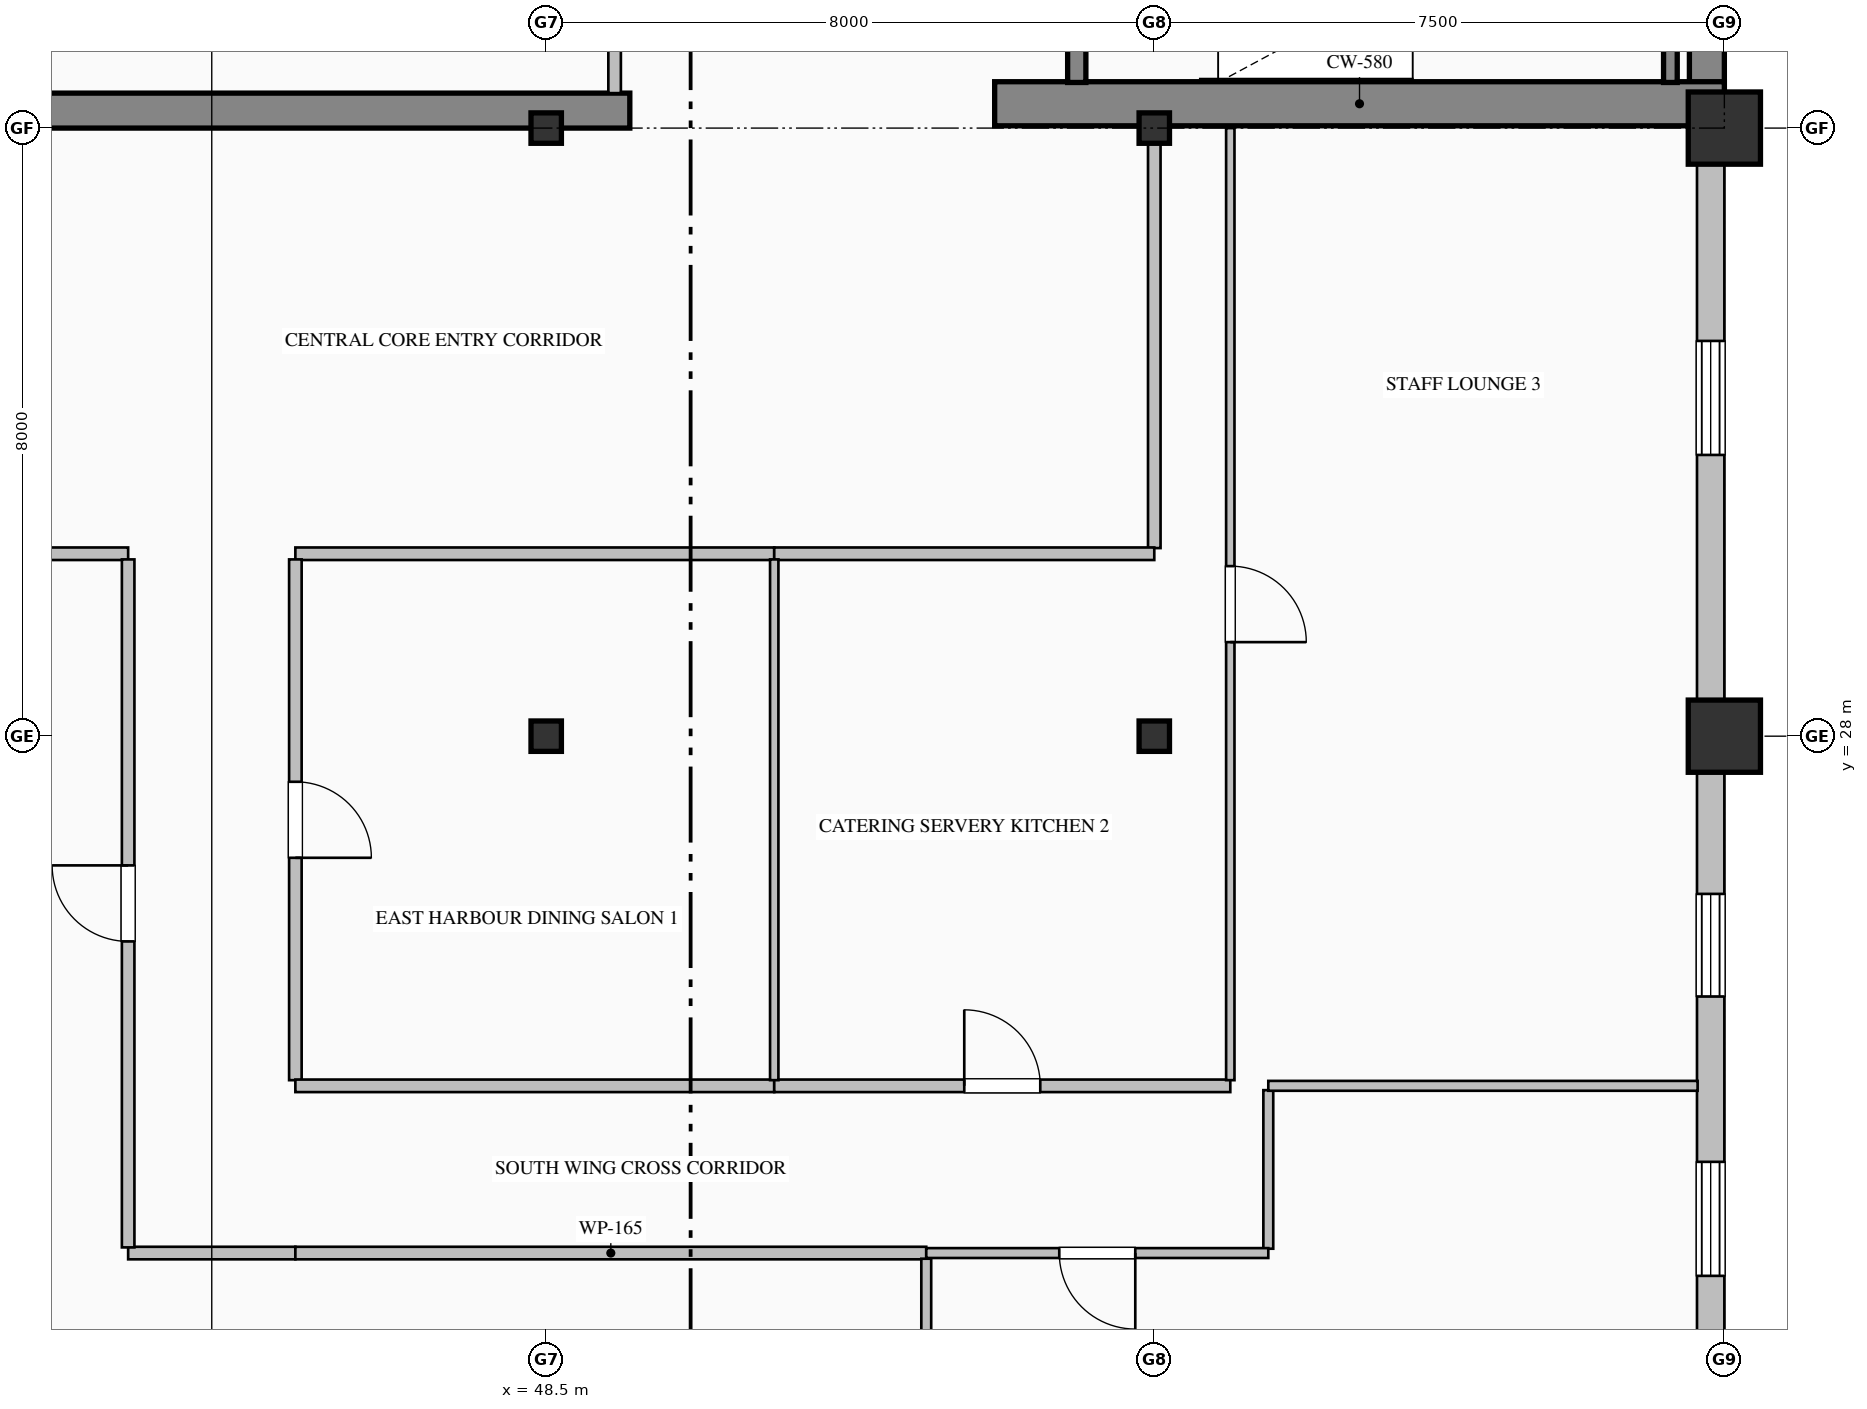
"""IFC4 building model, lengths in metres.
Left out: names, types, materials, properties, quantities, classifications, styles, units other than length and angle.
Written with IfcOpenShell. Run it as: python <this file> out.ifc"""

import sys

from ifc_helpers import new_model, si_unit, direction, frame, frame_2d, origin, origin_2d, place, context, subcontext, project, spatial, rectangle, hollow_rectangle, i_section, extrude, element, fill, save


model = new_model("IFC4")
c1 = context("Model", 3, precision=1e-05, world=origin(), true_north=direction((0.0, 1.0)))
c2 = subcontext(c1, "Body", "Model", "MODEL_VIEW")
j1 = project(units=[si_unit("LENGTHUNIT", "METRE"), si_unit("PLANEANGLEUNIT", "RADIAN")], contexts=[c1])
p1 = place(None, origin())
s1 = spatial("IfcSite", under=j1, at=p1, CompositionType="ELEMENT")
p2 = place(p1, origin())
s2 = spatial("IfcBuilding", under=s1, at=p2, CompositionType="ELEMENT")
p3 = place(p2, frame((0.0, 0.0, 245.8)))
s3 = spatial("IfcBuildingStorey", under=s2, at=p3, CompositionType="ELEMENT", Elevation=245.8)
p4 = place(p3, frame((63.77, 36.32, 0.0), z_axis=(0.0, 0.0, 1.0), x_axis=(0.0, 1.0, 0.0)))
e1 = element("IfcWall", 1, at=p4, inside=s3, PredefinedType="SHEAR", context=c2, shape_type="SweptSolid", body=[
    extrude(rectangle(XDim=15.22, YDim=0.46, at=frame_2d((7.61, 0.0))), origin(), (0.0, 0.0, 1.0), 3.775),
])
p5 = place(p3, frame((40.5, 36.23, 0.0), z_axis=(0.0, 0.0, 1.0), x_axis=(1.0, 0.0, 0.0)))
e2 = element("IfcWall", 2, at=p5, inside=s3, PredefinedType="SHEAR", context=c2, shape_type="SweptSolid", body=[
    extrude(rectangle(XDim=9.1, YDim=0.46, at=frame_2d((4.55, 0.0))), origin(), (0.0, 0.0, 1.0), 3.775),
])
p6 = place(p3, frame((54.4, 36.32, 0.0), z_axis=(0.0, 0.0, 1.0), x_axis=(1.0, 0.0, 0.0)))
e3 = element("IfcWall", 3, at=p6, inside=s3, PredefinedType="SHEAR", context=c2, shape_type="SweptSolid", body=[
    extrude(rectangle(XDim=9.6, YDim=0.58, at=frame_2d((4.8, 0.0))), origin(), (0.0, 0.0, 1.0), 4.0),
])
for number, where, z_axis, x_axis in (
    (4, (48.5, 28.0, 0.0), (0.0, 0.0, 1.0), (1.0, 0.0, 0.0)),
    (5, (48.5, 36.0, 0.0), (0.0, 0.0, 1.0), (1.0, 0.0, 0.0)),
    (6, (56.5, 28.0, 0.0), (0.0, 0.0, 1.0), (1.0, 0.0, 0.0)),
    (7, (56.5, 36.0, 0.0), (0.0, 0.0, 1.0), (1.0, 0.0, 0.0)),
):
    element("IfcColumn", number, at=place(p3, frame(where, z_axis=z_axis, x_axis=x_axis)), inside=s3, PredefinedType="COLUMN", context=c2, shape_type="SweptSolid", body=[
        extrude(i_section(OverallWidth=0.4, OverallDepth=0.4, WebThickness=0.013, FlangeThickness=0.021, FilletRadius=0.022, at=origin_2d()), origin(), (0.0, 0.0, 1.0), 4.0),
    ])
for number, where, z_axis, x_axis in (
    (8, (64.0, 28.0, 0.0), (0.0, 0.0, 1.0), (1.0, 0.0, 0.0)),
    (9, (64.0, 36.0, 0.0), (0.0, 0.0, 1.0), (1.0, 0.0, 0.0)),
):
    element("IfcColumn", number, at=place(p3, frame(where, z_axis=z_axis, x_axis=x_axis)), inside=s3, PredefinedType="COLUMN", context=c2, shape_type="SweptSolid", body=[
        extrude(hollow_rectangle(XDim=0.95, YDim=0.95, WallThickness=0.036, at=origin_2d()), origin(), (0.0, 0.0, 1.0), 4.0),
    ])
p7 = place(p3, frame((63.82, 36.05, 0.0), z_axis=(0.0, 0.0, 1.0), x_axis=(0.0, -1.0, 0.0)))
e10 = element("IfcWall", 10, at=p7, inside=s3, PredefinedType="SOLIDWALL", context=c2, shape_type="SweptSolid", body=[
    extrude(rectangle(XDim=19.55, YDim=0.36, at=frame_2d((9.775, 0.0))), origin(), (0.0, 0.0, 1.0), 3.325),
])
p8 = place(p7, frame((2.85, 0.0, 0.7)))
e11 = element("IfcOpeningElement", 11, at=p8, cuts=e10, PredefinedType="OPENING", context=c2, shape_type="SweptSolid", body=[
    extrude(rectangle(XDim=1.5, YDim=2.4, at=frame_2d((0.75, 1.2))), frame((0.0, 0.19, 0.0), z_axis=(0.0, -1.0, 0.0), x_axis=(1.0, 0.0, 0.0)), (0.0, 0.0, 1.0), 0.38),
])
p9 = place(p7, frame((10.125, 0.0, 0.9)))
e12 = element("IfcOpeningElement", 12, at=p9, cuts=e10, PredefinedType="OPENING", context=c2, shape_type="SweptSolid", body=[
    extrude(rectangle(XDim=1.35, YDim=1.85, at=frame_2d((0.675, 0.925))), frame((0.0, 0.19, 0.0), z_axis=(0.0, -1.0, 0.0), x_axis=(1.0, 0.0, 0.0)), (0.0, 0.0, 1.0), 0.38),
])
p10 = place(p7, frame((13.65, 0.0, 0.7)))
e13 = element("IfcOpeningElement", 13, at=p10, cuts=e10, PredefinedType="OPENING", context=c2, shape_type="SweptSolid", body=[
    extrude(rectangle(XDim=1.5, YDim=2.4, at=frame_2d((0.75, 1.2))), frame((0.0, 0.19, 0.0), z_axis=(0.0, -1.0, 0.0), x_axis=(1.0, 0.0, 0.0)), (0.0, 0.0, 1.0), 0.38),
])
p11 = place(p3, frame((55.48, 39.75, 0.0), z_axis=(0.0, 0.0, 1.0), x_axis=(0.0, -1.0, 0.0)))
e14 = element("IfcWall", 14, at=p11, inside=s3, PredefinedType="SOLIDWALL", context=c2, shape_type="SweptSolid", body=[
    extrude(rectangle(XDim=3.15, YDim=0.24, at=frame_2d((1.575, 0.0))), origin(), (0.0, 0.0, 1.0), 4.0),
])
p12 = place(p11, frame((1.0, 0.0, 0.0)))
e15 = element("IfcOpeningElement", 15, at=p12, cuts=e14, PredefinedType="OPENING", context=c2, shape_type="SweptSolid", body=[
    extrude(rectangle(XDim=1.15, YDim=2.2, at=frame_2d((0.575, 1.1))), frame((0.0, 0.13, 0.0), z_axis=(0.0, -1.0, 0.0), x_axis=(1.0, 0.0, 0.0)), (0.0, 0.0, 1.0), 0.26),
])
p13 = place(p3, frame((63.29, 36.6, 0.0), z_axis=(0.0, 0.0, 1.0), x_axis=(0.0, 1.0, 0.0)))
e16 = element("IfcWall", 16, at=p13, inside=s3, PredefinedType="SOLIDWALL", context=c2, shape_type="SweptSolid", body=[
    extrude(rectangle(XDim=3.15, YDim=0.18, at=frame_2d((1.575, 0.0))), origin(), (0.0, 0.0, 1.0), 4.0),
])
p14 = place(p3, frame((49.4, 36.46, 0.0), z_axis=(0.0, 0.0, 1.0), x_axis=(0.0, 1.0, 0.0)))
e17 = element("IfcWall", 17, at=p14, inside=s3, PredefinedType="PARTITIONING", context=c2, shape_type="SweptSolid", body=[
    extrude(rectangle(XDim=3.093, YDim=0.165, at=frame_2d((1.546, 0.0))), origin(), (0.0, 0.0, 1.0), 3.017),
])
p15 = place(p14, frame((1.046, 0.0, 0.0)))
e18 = element("IfcOpeningElement", 18, at=p15, cuts=e17, PredefinedType="OPENING", context=c2, shape_type="SweptSolid", body=[
    extrude(rectangle(XDim=1.0, YDim=2.15, at=frame_2d((0.5, 1.075))), frame((0.0, 0.093, 0.0), z_axis=(0.0, -1.0, 0.0), x_axis=(1.0, 0.0, 0.0)), (0.0, 0.0, 1.0), 0.185),
])
p16 = place(p3, frame((51.5, 30.4, 0.0), z_axis=(0.0, 0.0, 1.0), x_axis=(-1.0, 0.0, 0.0)))
e19 = element("IfcWall", 19, at=p16, inside=s3, PredefinedType="PARTITIONING", context=c2, shape_type="SweptSolid", body=[
    extrude(rectangle(XDim=6.3, YDim=0.165, at=frame_2d((3.15, 0.0))), origin(), (0.0, 0.0, 1.0), 3.775),
])
p17 = place(p3, frame((56.5, 36.0, 0.0), z_axis=(0.0, 0.0, 1.0), x_axis=(0.0, -1.0, 0.0)))
e20 = element("IfcWall", 20, at=p17, inside=s3, PredefinedType="PARTITIONING", context=c2, shape_type="SweptSolid", body=[
    extrude(rectangle(XDim=5.525, YDim=0.165, at=frame_2d((2.763, 0.0))), origin(), (0.0, 0.0, 1.0), 3.179),
])
p18 = place(p3, frame((56.5, 30.4, 0.0), z_axis=(0.0, 0.0, 1.0), x_axis=(-1.0, 0.0, 0.0)))
e21 = element("IfcWall", 21, at=p18, inside=s3, PredefinedType="PARTITIONING", context=c2, shape_type="SweptSolid", body=[
    extrude(rectangle(XDim=5.0, YDim=0.165, at=frame_2d((2.5, 0.0))), origin(), (0.0, 0.0, 1.0), 3.775),
])
p19 = place(p3, frame((43.0, 30.4, 0.0), z_axis=(0.0, 0.0, 1.0), x_axis=(-1.0, 0.0, 0.0)))
e22 = element("IfcWall", 22, at=p19, inside=s3, PredefinedType="PARTITIONING", context=c2, shape_type="SweptSolid", body=[
    extrude(rectangle(XDim=2.5, YDim=0.165, at=frame_2d((1.25, 0.0))), origin(), (0.0, 0.0, 1.0), 3.775),
])
p20 = place(p3, frame((45.2, 30.325, 0.0), z_axis=(0.0, 0.0, 1.0), x_axis=(0.0, -1.0, 0.0)))
e23 = element("IfcWall", 23, at=p20, inside=s3, PredefinedType="PARTITIONING", context=c2, shape_type="SweptSolid", body=[
    extrude(rectangle(XDim=6.851, YDim=0.165, at=frame_2d((3.425, 0.0))), origin(), (0.0, 0.0, 1.0), 3.775),
])
p21 = place(p20, frame((2.926, 0.0, 0.0)))
e24 = element("IfcOpeningElement", 24, at=p21, cuts=e23, PredefinedType="OPENING", context=c2, shape_type="SweptSolid", body=[
    extrude(rectangle(XDim=1.0, YDim=2.15, at=frame_2d((0.5, 1.075))), frame((0.0, 0.093, 0.0), z_axis=(0.0, -1.0, 0.0), x_axis=(1.0, 0.0, 0.0)), (0.0, 0.0, 1.0), 0.185),
])
p22 = place(p3, frame((45.2, 21.2, 0.0), z_axis=(0.0, 0.0, 1.0), x_axis=(-1.0, 0.0, 0.0)))
e25 = element("IfcWall", 25, at=p22, inside=s3, PredefinedType="PARTITIONING", context=c2, shape_type="SweptSolid", body=[
    extrude(rectangle(XDim=2.2, YDim=0.165, at=frame_2d((1.1, 0.0))), origin(), (0.0, 0.0, 1.0), 3.775),
])
p23 = place(p3, frame((43.0, 21.274, 0.0), z_axis=(0.0, 0.0, 1.0), x_axis=(0.0, 1.0, 0.0)))
e26 = element("IfcWall", 26, at=p23, inside=s3, PredefinedType="PARTITIONING", context=c2, shape_type="SweptSolid", body=[
    extrude(rectangle(XDim=9.051, YDim=0.165, at=frame_2d((4.525, 0.0))), origin(), (0.0, 0.0, 1.0), 3.775),
])
p24 = place(p23, frame((4.025, 0.0, 0.0)))
e27 = element("IfcOpeningElement", 27, at=p24, cuts=e26, PredefinedType="OPENING", context=c2, shape_type="SweptSolid", body=[
    extrude(rectangle(XDim=1.0, YDim=2.15, at=frame_2d((0.5, 1.075))), frame((0.0, 0.093, 0.0), z_axis=(0.0, -1.0, 0.0), x_axis=(1.0, 0.0, 0.0)), (0.0, 0.0, 1.0), 0.185),
])
p25 = place(p3, frame((45.2, 23.4, 0.0), z_axis=(0.0, 0.0, 1.0), x_axis=(1.0, 0.0, 0.0)))
e28 = element("IfcWall", 28, at=p25, inside=s3, PredefinedType="PARTITIONING", context=c2, shape_type="SweptSolid", body=[
    extrude(rectangle(XDim=6.3, YDim=0.165, at=frame_2d((3.15, 0.0))), origin(), (0.0, 0.0, 1.0), 3.467),
])
p26 = place(p3, frame((51.5, 23.4, 0.0), z_axis=(0.0, 0.0, 1.0), x_axis=(1.0, 0.0, 0.0)))
e29 = element("IfcWall", 29, at=p26, inside=s3, PredefinedType="PARTITIONING", context=c2, shape_type="SweptSolid", body=[
    extrude(rectangle(XDim=6.0, YDim=0.165, at=frame_2d((3.0, 0.0))), origin(), (0.0, 0.0, 1.0), 3.467),
])
p27 = place(p26, frame((2.5, 0.0, 0.0)))
e30 = element("IfcOpeningElement", 30, at=p27, cuts=e29, PredefinedType="OPENING", context=c2, shape_type="SweptSolid", body=[
    extrude(rectangle(XDim=1.0, YDim=2.15, at=frame_2d((0.5, 1.075))), frame((0.0, 0.093, 0.0), z_axis=(0.0, -1.0, 0.0), x_axis=(1.0, 0.0, 0.0)), (0.0, 0.0, 1.0), 0.185),
])
p28 = place(p3, frame((53.5, 21.2, 0.0), z_axis=(0.0, 0.0, 1.0), x_axis=(-1.0, 0.0, 0.0)))
e31 = element("IfcWall", 31, at=p28, inside=s3, PredefinedType="PARTITIONING", context=c2, shape_type="SweptSolid", body=[
    extrude(rectangle(XDim=8.3, YDim=0.165, at=frame_2d((4.15, 0.0))), origin(), (0.0, 0.0, 1.0), 3.775),
])
p29 = place(p3, frame((58.0, 23.343, 0.0), z_axis=(0.0, 0.0, 1.0), x_axis=(0.0, -1.0, 0.0)))
e32 = element("IfcWall", 32, at=p29, inside=s3, PredefinedType="PARTITIONING", context=c2, shape_type="SweptSolid", body=[
    extrude(rectangle(XDim=2.086, YDim=0.13, at=frame_2d((1.043, 0.0))), origin(), (0.0, 0.0, 1.0), 3.775),
])
p30 = place(p3, frame((58.0, 21.2, 0.0), z_axis=(0.0, 0.0, 1.0), x_axis=(-1.0, 0.0, 0.0)))
e33 = element("IfcWall", 33, at=p30, inside=s3, PredefinedType="PARTITIONING", context=c2, shape_type="SweptSolid", body=[
    extrude(rectangle(XDim=4.5, YDim=0.13, at=frame_2d((2.25, 0.0))), origin(), (0.0, 0.0, 1.0), 3.775),
])
p31 = place(p30, frame((1.75, 0.0, 0.0)))
e34 = element("IfcOpeningElement", 34, at=p31, cuts=e33, PredefinedType="OPENING", context=c2, shape_type="SweptSolid", body=[
    extrude(rectangle(XDim=1.0, YDim=2.15, at=frame_2d((0.5, 1.075))), frame((0.0, 0.075, 0.0), z_axis=(0.0, -1.0, 0.0), x_axis=(1.0, 0.0, 0.0)), (0.0, 0.0, 1.0), 0.15),
])
p32 = place(p3, frame((51.5, 30.325, 0.0), z_axis=(0.0, 0.0, 1.0), x_axis=(0.0, -1.0, 0.0)))
e35 = element("IfcWall", 35, at=p32, inside=s3, PredefinedType="MOVABLE", context=c2, shape_type="SweptSolid", body=[
    extrude(rectangle(XDim=6.851, YDim=0.11, at=frame_2d((3.425, 0.0))), origin(), (0.0, 0.0, 1.0), 3.775),
])
p33 = place(p3, frame((57.5, 36.0, 0.0), z_axis=(0.0, 0.0, 1.0), x_axis=(0.0, -1.0, 0.0)))
e36 = element("IfcWall", 36, at=p33, inside=s3, PredefinedType="MOVABLE", context=c2, shape_type="SweptSolid", body=[
    extrude(rectangle(XDim=12.525, YDim=0.11, at=frame_2d((6.263, 0.0))), origin(), (0.0, 0.0, 1.0), 3.775),
])
p34 = place(p33, frame((5.763, 0.0, 0.0)))
e37 = element("IfcOpeningElement", 37, at=p34, cuts=e36, PredefinedType="OPENING", context=c2, shape_type="SweptSolid", body=[
    extrude(rectangle(XDim=1.0, YDim=2.15, at=frame_2d((0.5, 1.075))), frame((0.0, 0.065, 0.0), z_axis=(0.0, -1.0, 0.0), x_axis=(1.0, 0.0, 0.0)), (0.0, 0.0, 1.0), 0.13),
])
p35 = place(p3, frame((63.648, 23.4, 0.0), z_axis=(0.0, 0.0, 1.0), x_axis=(-1.0, 0.0, 0.0)))
e38 = element("IfcWall", 38, at=p35, inside=s3, PredefinedType="PARTITIONING", context=c2, shape_type="SweptSolid", body=[
    extrude(rectangle(XDim=5.648, YDim=0.13, at=frame_2d((2.824, 0.0))), origin(), (0.0, 0.0, 1.0), 3.775),
])
p36 = place(p3, frame((53.5, 21.125, 0.0), z_axis=(0.0, 0.0, 1.0), x_axis=(0.0, -1.0, 0.0)))
e39 = element("IfcWall", 39, at=p36, inside=s3, PredefinedType="PARTITIONING", context=c2, shape_type="SweptSolid", body=[
    extrude(rectangle(XDim=8.273, YDim=0.13, at=frame_2d((4.137, 0.0))), origin(), (0.0, 0.0, 1.0), 3.775),
])
p37 = place(p8, origin())
e40 = element("IfcWindow", 40, at=p37, inside=s3, PartitioningType="DOUBLE_PANEL_HORIZONTAL", PredefinedType="WINDOW", context=c2, shape_type="SweptSolid", body=[
    extrude(rectangle(XDim=1.5, YDim=2.4, at=frame_2d((0.75, 1.2))), frame((0.0, 0.15, 0.0), z_axis=(0.0, -1.0, 0.0), x_axis=(1.0, 0.0, 0.0)), (0.0, 0.0, 1.0), 0.06),
])
fill(e11, e40)
p38 = place(p9, origin())
e41 = element("IfcWindow", 41, at=p38, inside=s3, PartitioningType="DOUBLE_PANEL_VERTICAL", PredefinedType="WINDOW", context=c2, shape_type="SweptSolid", body=[
    extrude(rectangle(XDim=1.35, YDim=1.85, at=frame_2d((0.675, 0.925))), frame((0.0, 0.15, 0.0), z_axis=(0.0, -1.0, 0.0), x_axis=(1.0, 0.0, 0.0)), (0.0, 0.0, 1.0), 0.06),
])
fill(e12, e41)
p39 = place(p10, origin())
e42 = element("IfcWindow", 42, at=p39, inside=s3, PartitioningType="DOUBLE_PANEL_HORIZONTAL", PredefinedType="WINDOW", context=c2, shape_type="SweptSolid", body=[
    extrude(rectangle(XDim=1.5, YDim=2.4, at=frame_2d((0.75, 1.2))), frame((0.0, 0.15, 0.0), z_axis=(0.0, -1.0, 0.0), x_axis=(1.0, 0.0, 0.0)), (0.0, 0.0, 1.0), 0.06),
])
fill(e13, e42)
p40 = place(p21, origin())
e43 = element("IfcDoor", 43, at=p40, inside=s3, OperationType="SINGLE_SWING_RIGHT", PredefinedType="DOOR", context=c2, shape_type="SweptSolid", body=[
    extrude(rectangle(XDim=1.0, YDim=2.15, at=frame_2d((0.5, 1.075))), frame((0.0, 0.025, 0.0), z_axis=(0.0, -1.0, 0.0), x_axis=(1.0, 0.0, 0.0)), (0.0, 0.0, 1.0), 0.05),
])
fill(e24, e43)
p41 = place(p27, origin())
e44 = element("IfcDoor", 44, at=p41, inside=s3, OperationType="SINGLE_SWING_LEFT", PredefinedType="DOOR", context=c2, shape_type="SweptSolid", body=[
    extrude(rectangle(XDim=1.0, YDim=2.15, at=frame_2d((0.5, 1.075))), frame((0.0, 0.025, 0.0), z_axis=(0.0, -1.0, 0.0), x_axis=(1.0, 0.0, 0.0)), (0.0, 0.0, 1.0), 0.05),
])
fill(e30, e44)
p42 = place(p34, origin())
e45 = element("IfcDoor", 45, at=p42, inside=s3, OperationType="SINGLE_SWING_RIGHT", PredefinedType="DOOR", context=c2, shape_type="SweptSolid", body=[
    extrude(rectangle(XDim=1.0, YDim=2.15, at=frame_2d((0.5, 1.075))), frame((0.0, 0.025, 0.0), z_axis=(0.0, -1.0, 0.0), x_axis=(1.0, 0.0, 0.0)), (0.0, 0.0, 1.0), 0.05),
])
fill(e37, e45)
p43 = place(p24, origin())
e46 = element("IfcDoor", 46, at=p43, inside=s3, OperationType="SINGLE_SWING_RIGHT", PredefinedType="DOOR", context=c2, shape_type="SweptSolid", body=[
    extrude(rectangle(XDim=1.0, YDim=2.15, at=frame_2d((0.5, 1.075))), frame((0.0, 0.025, 0.0), z_axis=(0.0, -1.0, 0.0), x_axis=(1.0, 0.0, 0.0)), (0.0, 0.0, 1.0), 0.05),
])
fill(e27, e46)
p44 = place(p31, origin())
e47 = element("IfcDoor", 47, at=p44, inside=s3, OperationType="SINGLE_SWING_LEFT", PredefinedType="DOOR", context=c2, shape_type="SweptSolid", body=[
    extrude(rectangle(XDim=1.0, YDim=2.15, at=frame_2d((0.5, 1.075))), frame((0.0, 0.025, 0.0), z_axis=(0.0, -1.0, 0.0), x_axis=(1.0, 0.0, 0.0)), (0.0, 0.0, 1.0), 0.05),
])
fill(e34, e47)
save(model, sys.argv[1])
